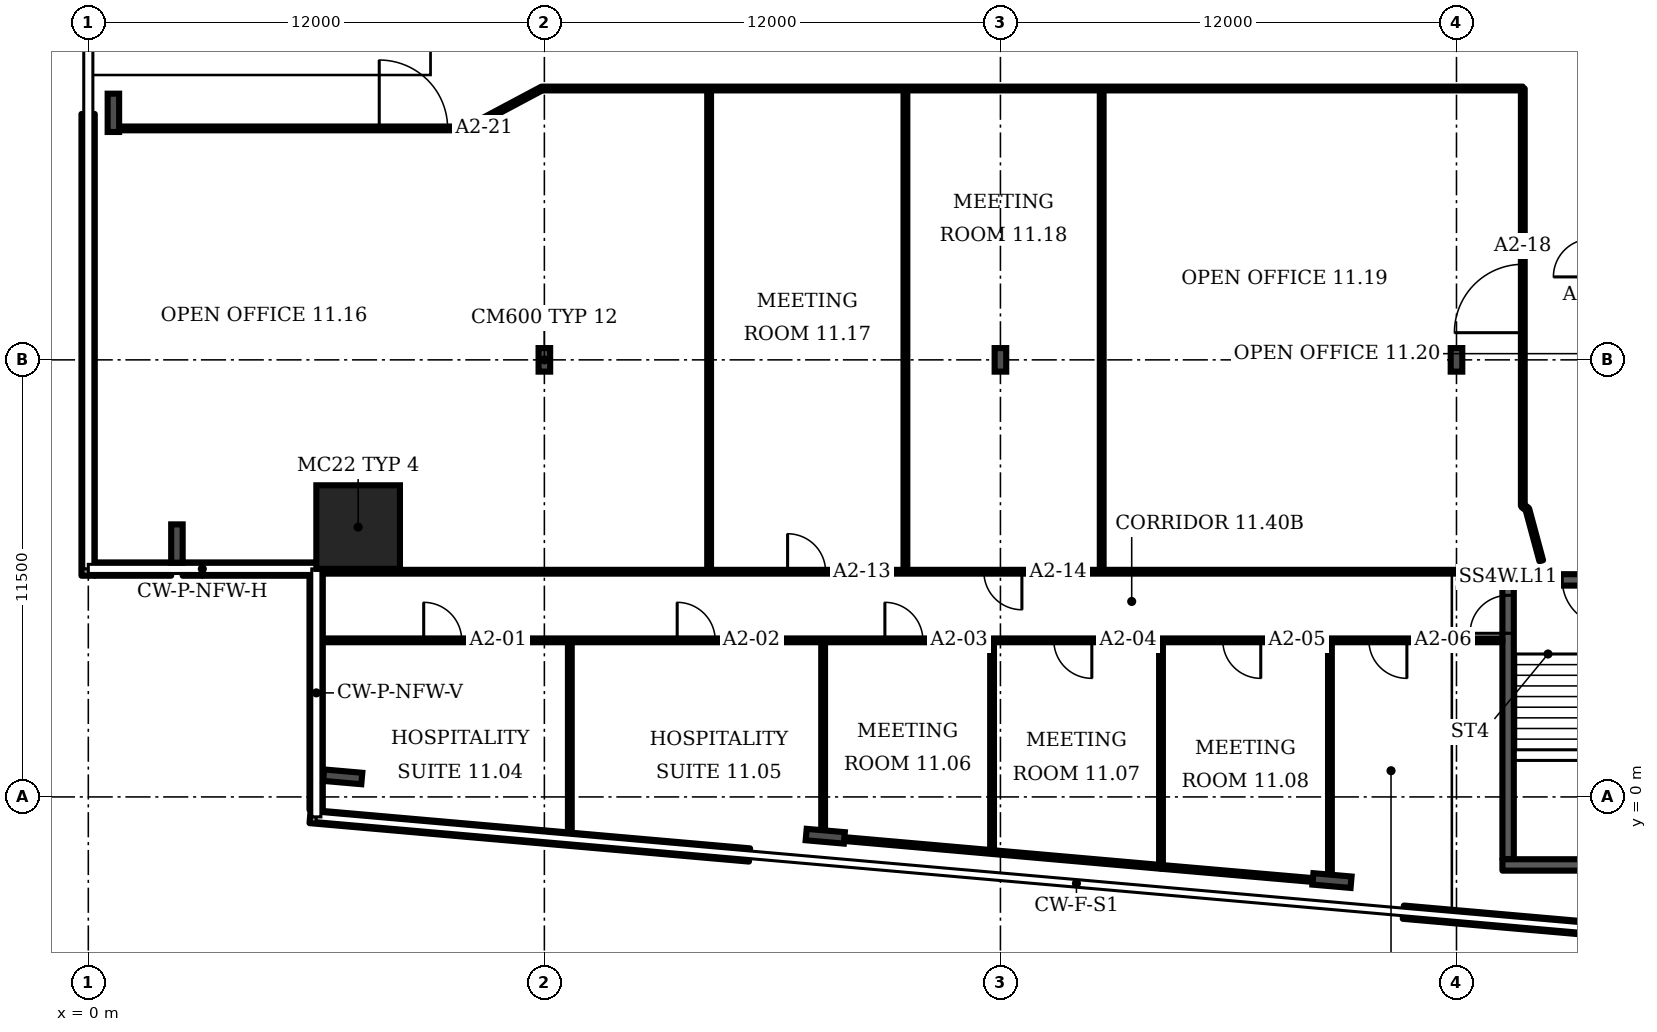
"""IFC4 building model, lengths in metres.
Left out: names, types, materials, properties, quantities, classifications, styles, units other than length and angle.
Written with IfcOpenShell. Run it as: python <this file> out.ifc"""

import sys

from ifc_helpers import new_model, si_unit, direction, frame, frame_2d, origin, origin_2d, place, context, subcontext, project, spatial, rectangle, i_section, extrude, element, fill, save


model = new_model("IFC4")
c1 = context("Model", 3, precision=1e-05, world=origin(), true_north=direction((0.0, 1.0)))
c2 = subcontext(c1, "Body", "Model", "MODEL_VIEW")
j1 = project(units=[si_unit("LENGTHUNIT", "METRE"), si_unit("PLANEANGLEUNIT", "RADIAN")], contexts=[c1])
p1 = place(None, origin())
s1 = spatial("IfcSite", under=j1, at=p1, CompositionType="ELEMENT")
p2 = place(p1, origin())
s2 = spatial("IfcBuilding", under=s1, at=p2, CompositionType="ELEMENT")
p3 = place(p2, frame((0.0, 0.0, 59.5)))
s3 = spatial("IfcBuildingStorey", under=s2, at=p3, CompositionType="ELEMENT", Elevation=59.5)
p4 = place(p3, frame((7.1, 7.1, 0.0), z_axis=(0.0, 0.0, 1.0), x_axis=(1.0, 0.0, 0.0)))
e1 = element("IfcColumn", 1, at=p4, inside=s3, PredefinedType="COLUMN", context=c2, shape_type="SweptSolid", body=[
    extrude(rectangle(XDim=2.2, YDim=2.2, at=origin_2d()), origin(), (0.0, 0.0, 1.0), 3.6),
])
for number, where, z_axis, x_axis in (
    (2, (6.694, 0.529, 0.0), (0.0, 0.0, 1.0), (-0.087, -0.996, 0.0)),
    (3, (19.391, -1.034, 0.0), (0.0, 0.0, 1.0), (-0.087, -0.996, 0.0)),
    (4, (32.724, -2.2, 0.0), (0.0, 0.0, 1.0), (-0.087, -0.996, 0.0)),
    (5, (0.66, 18.0, 0.0), (0.0, 0.0, 1.0), (-1.0, 0.0, 0.0)),
    (6, (2.332, 6.667, 0.0), (0.0, 0.0, 1.0), (-1.0, 0.0, 0.0)),
):
    element("IfcColumn", number, at=place(p3, frame(where, z_axis=z_axis, x_axis=x_axis)), inside=s3, PredefinedType="COLUMN", context=c2, shape_type="SweptSolid", body=[
        extrude(i_section(OverallWidth=0.302, OverallDepth=1.008, WebThickness=0.021, FlangeThickness=0.04, FilletRadius=0.03, at=origin_2d()), origin(), (0.0, 0.0, 1.0), 3.6),
    ])
for number, where, z_axis, x_axis in (
    (7, (12.0, 11.5, 0.0), (0.0, 0.0, 1.0), (1.0, 0.0, 0.0)),
    (8, (24.0, 11.5, 0.0), (0.0, 0.0, 1.0), (1.0, 0.0, 0.0)),
    (9, (36.0, 11.5, 0.0), (0.0, 0.0, 1.0), (1.0, 0.0, 0.0)),
):
    element("IfcColumn", number, at=place(p3, frame(where, z_axis=z_axis, x_axis=x_axis)), inside=s3, PredefinedType="COLUMN", context=c2, shape_type="SweptSolid", body=[
        extrude(i_section(OverallWidth=0.305, OverallDepth=0.62, WebThickness=0.021, FlangeThickness=0.04, FilletRadius=0.027, at=origin_2d()), origin(), (0.0, 0.0, 1.0), 3.6),
    ])
p5 = place(p3, frame((5.835, -0.516, 0.0), z_axis=(0.0, 0.0, 1.0), x_axis=(0.996192, -0.087142, 0.0)))
e10 = element("IfcWall", 10, at=p5, inside=s3, PredefinedType="SOLIDWALL", context=c2, shape_type="SweptSolid", body=[
    extrude(rectangle(XDim=11.607, YDim=0.35, at=frame_2d((5.804, 0.0))), origin(), (0.0, 0.0, 1.0), 1.0),
])
p6 = place(p3, frame((34.601, -3.032, 0.0), z_axis=(0.0, 0.0, 1.0), x_axis=(0.996193, -0.087148, 0.0)))
e11 = element("IfcWall", 11, at=p6, inside=s3, PredefinedType="SOLIDWALL", context=c2, shape_type="SweptSolid", body=[
    extrude(rectangle(XDim=11.458, YDim=0.35, at=frame_2d((5.729, 0.0))), origin(), (0.0, 0.0, 1.0), 1.0),
])
p7 = place(p3, frame((-0.005, 17.97, 0.0), z_axis=(0.0, 0.0, 1.0), x_axis=(0.0, -1.0, 0.0)))
e12 = element("IfcWall", 12, at=p7, inside=s3, PredefinedType="SOLIDWALL", context=c2, shape_type="SweptSolid", body=[
    extrude(rectangle(XDim=12.15, YDim=0.35, at=frame_2d((6.075, 0.0))), origin(), (0.0, 0.0, 1.0), 1.0),
])
p8 = place(p3, frame((0.17, 5.995, 0.0), z_axis=(0.0, 0.0, 1.0), x_axis=(1.0, 0.0, 0.0)))
e13 = element("IfcWall", 13, at=p8, inside=s3, PredefinedType="SOLIDWALL", context=c2, shape_type="SweptSolid", body=[
    extrude(rectangle(XDim=2.011, YDim=0.35, at=frame_2d((1.005, 0.0))), origin(), (0.0, 0.0, 1.0), 1.0),
])
p9 = place(p3, frame((2.483, 5.995, 0.0), z_axis=(0.0, 0.0, 1.0), x_axis=(1.0, 0.0, 0.0)))
e14 = element("IfcWall", 14, at=p9, inside=s3, PredefinedType="SOLIDWALL", context=c2, shape_type="SweptSolid", body=[
    extrude(rectangle(XDim=3.517, YDim=0.35, at=frame_2d((1.759, 0.0))), origin(), (0.0, 0.0, 1.0), 1.0),
])
p10 = place(p3, frame((5.995, 5.82, 0.0), z_axis=(0.0, 0.0, 1.0), x_axis=(0.0, -1.0, 0.0)))
e15 = element("IfcWall", 15, at=p10, inside=s3, PredefinedType="SOLIDWALL", context=c2, shape_type="SweptSolid", body=[
    extrude(rectangle(XDim=6.161, YDim=0.35, at=frame_2d((3.081, 0.0))), origin(), (0.0, 0.0, 1.0), 1.0),
])
p11 = place(p3, frame((37.208, 5.711, 0.0), z_axis=(0.0, 0.0, 1.0), x_axis=(1.0, 0.0, 0.0)))
e16 = element("IfcWall", 16, at=p11, inside=s3, PredefinedType="SHEAR", context=c2, shape_type="SweptSolid", body=[
    extrude(rectangle(XDim=4.35, YDim=0.3, at=frame_2d((2.175, 0.0))), origin(), (0.0, 0.0, 1.0), 3.2),
])
p12 = place(p11, frame((1.575, 0.0, 0.0)))
e17 = element("IfcOpeningElement", 17, at=p12, cuts=e16, PredefinedType="OPENING", context=c2, shape_type="SweptSolid", body=[
    extrude(rectangle(XDim=1.2, YDim=2.1, at=frame_2d((0.6, 1.05))), frame((0.0, 0.16, 0.0), z_axis=(0.0, -1.0, 0.0), x_axis=(1.0, 0.0, 0.0)), (0.0, 0.0, 1.0), 0.32),
])
p13 = place(p3, frame((37.358, -1.639, 0.0), z_axis=(0.0, 0.0, 1.0), x_axis=(0.0, 1.0, 0.0)))
e18 = element("IfcWall", 18, at=p13, inside=s3, PredefinedType="SHEAR", context=c2, shape_type="SweptSolid", body=[
    extrude(rectangle(XDim=7.2, YDim=0.3, at=frame_2d((3.6, 0.0))), origin(), (0.0, 0.0, 1.0), 3.2),
])
p14 = place(p13, frame((5.945, 0.0, 0.0)))
e19 = element("IfcOpeningElement", 19, at=p14, cuts=e18, PredefinedType="OPENING", context=c2, shape_type="SweptSolid", body=[
    extrude(rectangle(XDim=1.0, YDim=2.1, at=frame_2d((0.5, 1.05))), frame((0.0, 0.16, 0.0), z_axis=(0.0, -1.0, 0.0), x_axis=(1.0, 0.0, 0.0)), (0.0, 0.0, 1.0), 0.32),
])
p15 = place(p3, frame((0.63, 17.59, 0.0), z_axis=(0.0, 0.0, 1.0), x_axis=(1.0, 0.0, 0.0)))
e20 = element("IfcWall", 20, at=p15, inside=s3, PredefinedType="PARTITIONING", context=c2, shape_type="SweptSolid", body=[
    extrude(rectangle(XDim=9.55, YDim=0.1, at=frame_2d((4.775, 0.0))), origin(), (0.0, 0.0, 1.0), 3.2),
])
p16 = place(p15, frame((7.025, 0.0, 0.0)))
e21 = element("IfcOpeningElement", 21, at=p16, cuts=e20, PredefinedType="OPENING", context=c2, shape_type="SweptSolid", body=[
    extrude(rectangle(XDim=1.8, YDim=2.1, at=frame_2d((0.9, 1.05))), frame((0.0, 0.06, 0.0), z_axis=(0.0, -1.0, 0.0), x_axis=(1.0, 0.0, 0.0)), (0.0, 0.0, 1.0), 0.12),
])
p17 = place(p3, frame((6.02, 4.12, 0.0), z_axis=(0.0, 0.0, 1.0), x_axis=(1.0, 0.0, 0.0)))
e22 = element("IfcWall", 22, at=p17, inside=s3, PredefinedType="PARTITIONING", context=c2, shape_type="SweptSolid", body=[
    extrude(rectangle(XDim=31.188, YDim=0.1, at=frame_2d((15.594, 0.0))), origin(), (0.0, 0.0, 1.0), 3.2),
])
p18 = place(p17, frame((2.805, 0.0, 0.0)))
e23 = element("IfcOpeningElement", 23, at=p18, cuts=e22, PredefinedType="OPENING", context=c2, shape_type="SweptSolid", body=[
    extrude(rectangle(XDim=1.0, YDim=2.1, at=frame_2d((0.5, 1.05))), frame((0.0, 0.06, 0.0), z_axis=(0.0, -1.0, 0.0), x_axis=(1.0, 0.0, 0.0)), (0.0, 0.0, 1.0), 0.12),
])
p19 = place(p17, frame((9.475, 0.0, 0.0)))
e24 = element("IfcOpeningElement", 24, at=p19, cuts=e22, PredefinedType="OPENING", context=c2, shape_type="SweptSolid", body=[
    extrude(rectangle(XDim=1.0, YDim=2.1, at=frame_2d((0.5, 1.05))), frame((0.0, 0.06, 0.0), z_axis=(0.0, -1.0, 0.0), x_axis=(1.0, 0.0, 0.0)), (0.0, 0.0, 1.0), 0.12),
])
p20 = place(p17, frame((14.94, 0.0, 0.0)))
e25 = element("IfcOpeningElement", 25, at=p20, cuts=e22, PredefinedType="OPENING", context=c2, shape_type="SweptSolid", body=[
    extrude(rectangle(XDim=1.0, YDim=2.1, at=frame_2d((0.5, 1.05))), frame((0.0, 0.06, 0.0), z_axis=(0.0, -1.0, 0.0), x_axis=(1.0, 0.0, 0.0)), (0.0, 0.0, 1.0), 0.12),
])
p21 = place(p17, frame((19.385, 0.0, 0.0)))
e26 = element("IfcOpeningElement", 26, at=p21, cuts=e22, PredefinedType="OPENING", context=c2, shape_type="SweptSolid", body=[
    extrude(rectangle(XDim=1.0, YDim=2.1, at=frame_2d((0.5, 1.05))), frame((0.0, 0.06, 0.0), z_axis=(0.0, -1.0, 0.0), x_axis=(1.0, 0.0, 0.0)), (0.0, 0.0, 1.0), 0.12),
])
p22 = place(p17, frame((23.83, 0.0, 0.0)))
e27 = element("IfcOpeningElement", 27, at=p22, cuts=e22, PredefinedType="OPENING", context=c2, shape_type="SweptSolid", body=[
    extrude(rectangle(XDim=1.0, YDim=2.1, at=frame_2d((0.5, 1.05))), frame((0.0, 0.06, 0.0), z_axis=(0.0, -1.0, 0.0), x_axis=(1.0, 0.0, 0.0)), (0.0, 0.0, 1.0), 0.12),
])
p23 = place(p17, frame((27.675, 0.0, 0.0)))
e28 = element("IfcOpeningElement", 28, at=p23, cuts=e22, PredefinedType="OPENING", context=c2, shape_type="SweptSolid", body=[
    extrude(rectangle(XDim=1.0, YDim=2.1, at=frame_2d((0.5, 1.05))), frame((0.0, 0.06, 0.0), z_axis=(0.0, -1.0, 0.0), x_axis=(1.0, 0.0, 0.0)), (0.0, 0.0, 1.0), 0.12),
])
p24 = place(p3, frame((6.02, 5.925, 0.0), z_axis=(0.0, 0.0, 1.0), x_axis=(1.0, 0.0, 0.0)))
e29 = element("IfcWall", 29, at=p24, inside=s3, PredefinedType="PARTITIONING", context=c2, shape_type="SweptSolid", body=[
    extrude(rectangle(XDim=32.21, YDim=0.1, at=frame_2d((16.105, 0.0))), origin(), (0.0, 0.0, 1.0), 3.2),
])
p25 = place(p24, frame((12.38, 0.0, 0.0)))
e30 = element("IfcOpeningElement", 30, at=p25, cuts=e29, PredefinedType="OPENING", context=c2, shape_type="SweptSolid", body=[
    extrude(rectangle(XDim=1.0, YDim=2.1, at=frame_2d((0.5, 1.05))), frame((0.0, 0.06, 0.0), z_axis=(0.0, -1.0, 0.0), x_axis=(1.0, 0.0, 0.0)), (0.0, 0.0, 1.0), 0.12),
])
p26 = place(p24, frame((17.545, 0.0, 0.0)))
e31 = element("IfcOpeningElement", 31, at=p26, cuts=e29, PredefinedType="OPENING", context=c2, shape_type="SweptSolid", body=[
    extrude(rectangle(XDim=1.0, YDim=2.1, at=frame_2d((0.5, 1.05))), frame((0.0, 0.06, 0.0), z_axis=(0.0, -1.0, 0.0), x_axis=(1.0, 0.0, 0.0)), (0.0, 0.0, 1.0), 0.12),
])
p27 = place(p3, frame((10.18, 17.59, 0.0), z_axis=(0.0, 0.0, 1.0), x_axis=(0.435266, 0.900306, 0.0)))
e32 = element("IfcWall", 32, at=p27, inside=s3, PredefinedType="PARTITIONING", context=c2, shape_type="SweptSolid", body=[
    extrude(rectangle(XDim=0.172, YDim=0.1, at=frame_2d((0.086, 0.0))), origin(), (0.0, 0.0, 1.0), 3.2),
])
p28 = place(p3, frame((10.255, 17.745, 0.0), z_axis=(0.0, 0.0, 1.0), x_axis=(0.882644, 0.470051, 0.0)))
e33 = element("IfcWall", 33, at=p28, inside=s3, PredefinedType="PARTITIONING", context=c2, shape_type="SweptSolid", body=[
    extrude(rectangle(XDim=1.904, YDim=0.1, at=frame_2d((0.952, 0.0))), origin(), (0.0, 0.0, 1.0), 3.2),
])
p29 = place(p3, frame((11.935, 18.64, 0.0), z_axis=(0.0, 0.0, 1.0), x_axis=(1.0, 0.0, 0.0)))
e34 = element("IfcWall", 34, at=p29, inside=s3, PredefinedType="PARTITIONING", context=c2, shape_type="SweptSolid", body=[
    extrude(rectangle(XDim=25.81, YDim=0.1, at=frame_2d((12.905, 0.0))), origin(), (0.0, 0.0, 1.0), 3.2),
])
p30 = place(p3, frame((12.67, -1.088, 0.0), z_axis=(0.0, 0.0, 1.0), x_axis=(0.0, 1.0, 0.0)))
e35 = element("IfcWall", 35, at=p30, inside=s3, PredefinedType="PARTITIONING", context=c2, shape_type="SweptSolid", body=[
    extrude(rectangle(XDim=5.208, YDim=0.1, at=frame_2d((2.604, 0.0))), origin(), (0.0, 0.0, 1.0), 3.2),
])
p31 = place(p3, frame((16.335, 5.925, 0.0), z_axis=(0.0, 0.0, 1.0), x_axis=(0.0, 1.0, 0.0)))
e36 = element("IfcWall", 36, at=p31, inside=s3, PredefinedType="PARTITIONING", context=c2, shape_type="SweptSolid", body=[
    extrude(rectangle(XDim=12.715, YDim=0.1, at=frame_2d((6.357, 0.0))), origin(), (0.0, 0.0, 1.0), 3.2),
])
p32 = place(p3, frame((19.335, -1.06, 0.0), z_axis=(0.0, 0.0, 1.0), x_axis=(0.0, 1.0, 0.0)))
e37 = element("IfcWall", 37, at=p32, inside=s3, PredefinedType="PARTITIONING", context=c2, shape_type="SweptSolid", body=[
    extrude(rectangle(XDim=5.18, YDim=0.1, at=frame_2d((2.59, 0.0))), origin(), (0.0, 0.0, 1.0), 3.2),
])
p33 = place(p3, frame((21.5, 5.925, 0.0), z_axis=(0.0, 0.0, 1.0), x_axis=(0.0, 1.0, 0.0)))
e38 = element("IfcWall", 38, at=p33, inside=s3, PredefinedType="PARTITIONING", context=c2, shape_type="SweptSolid", body=[
    extrude(rectangle(XDim=12.715, YDim=0.1, at=frame_2d((6.357, 0.0))), origin(), (0.0, 0.0, 1.0), 3.2),
])
p34 = place(p3, frame((23.78, -1.45, 0.0), z_axis=(0.0, 0.0, 1.0), x_axis=(0.0, 1.0, 0.0)))
e39 = element("IfcWall", 39, at=p34, inside=s3, PredefinedType="PARTITIONING", context=c2, shape_type="SweptSolid", body=[
    extrude(rectangle(XDim=5.57, YDim=0.1, at=frame_2d((2.785, 0.0))), origin(), (0.0, 0.0, 1.0), 3.2),
])
p35 = place(p3, frame((26.665, 5.925, 0.0), z_axis=(0.0, 0.0, 1.0), x_axis=(0.0, 1.0, 0.0)))
e40 = element("IfcWall", 40, at=p35, inside=s3, PredefinedType="PARTITIONING", context=c2, shape_type="SweptSolid", body=[
    extrude(rectangle(XDim=12.715, YDim=0.1, at=frame_2d((6.357, 0.0))), origin(), (0.0, 0.0, 1.0), 3.2),
])
p36 = place(p3, frame((28.22, -1.84, 0.0), z_axis=(0.0, 0.0, 1.0), x_axis=(-0.996164, 0.087512, 0.0)))
e41 = element("IfcWall", 41, at=p36, inside=s3, PredefinedType="PARTITIONING", context=c2, shape_type="SweptSolid", body=[
    extrude(rectangle(XDim=8.919, YDim=0.1, at=frame_2d((4.459, 0.0))), origin(), (0.0, 0.0, 1.0), 2.58),
])
p37 = place(p3, frame((28.225, -1.84, 0.0), z_axis=(0.0, 0.0, 1.0), x_axis=(0.0, 1.0, 0.0)))
e42 = element("IfcWall", 42, at=p37, inside=s3, PredefinedType="PARTITIONING", context=c2, shape_type="SweptSolid", body=[
    extrude(rectangle(XDim=5.96, YDim=0.1, at=frame_2d((2.98, 0.0))), origin(), (0.0, 0.0, 1.0), 3.2),
])
p38 = place(p3, frame((32.665, -2.225, 0.0), z_axis=(0.0, 0.0, 1.0), x_axis=(-0.996263, 0.086391, 0.0)))
e43 = element("IfcWall", 43, at=p38, inside=s3, PredefinedType="PARTITIONING", context=c2, shape_type="SweptSolid", body=[
    extrude(rectangle(XDim=4.457, YDim=0.1, at=frame_2d((2.228, 0.0))), origin(), (0.0, 0.0, 1.0), 2.58),
])
p39 = place(p3, frame((32.67, -2.225, 0.0), z_axis=(0.0, 0.0, 1.0), x_axis=(0.0, 1.0, 0.0)))
e44 = element("IfcWall", 44, at=p39, inside=s3, PredefinedType="PARTITIONING", context=c2, shape_type="SweptSolid", body=[
    extrude(rectangle(XDim=6.345, YDim=0.1, at=frame_2d((3.173, 0.0))), origin(), (0.0, 0.0, 1.0), 3.2),
])
p40 = place(p3, frame((37.745, 7.66, 0.0), z_axis=(0.0, 0.0, 1.0), x_axis=(0.0, 1.0, 0.0)))
e45 = element("IfcWall", 45, at=p40, inside=s3, PredefinedType="PARTITIONING", context=c2, shape_type="SweptSolid", body=[
    extrude(rectangle(XDim=10.98, YDim=0.1, at=frame_2d((5.49, 0.0))), origin(), (0.0, 0.0, 1.0), 3.2),
])
p41 = place(p40, frame((4.555, 0.0, 0.0)))
e46 = element("IfcOpeningElement", 46, at=p41, cuts=e45, PredefinedType="OPENING", context=c2, shape_type="SweptSolid", body=[
    extrude(rectangle(XDim=1.8, YDim=2.1, at=frame_2d((0.9, 1.05))), frame((0.0, 0.06, 0.0), z_axis=(0.0, -1.0, 0.0), x_axis=(1.0, 0.0, 0.0)), (0.0, 0.0, 1.0), 0.12),
])
p42 = place(p3, frame((37.865, 7.57, 0.0), z_axis=(0.0, 0.0, 1.0), x_axis=(-0.800198, 0.599741, 0.0)))
e47 = element("IfcWall", 47, at=p42, inside=s3, PredefinedType="PARTITIONING", context=c2, shape_type="SweptSolid", body=[
    extrude(rectangle(XDim=0.15, YDim=0.1, at=frame_2d((0.075, 0.0))), origin(), (0.0, 0.0, 1.0), 3.2),
])
p43 = place(p3, frame((38.23, 6.215, 0.0), z_axis=(0.0, 0.0, 1.0), x_axis=(-0.260099, 0.965585, 0.0)))
e48 = element("IfcWall", 48, at=p43, inside=s3, PredefinedType="PARTITIONING", context=c2, shape_type="SweptSolid", body=[
    extrude(rectangle(XDim=1.403, YDim=0.1, at=frame_2d((0.702, 0.0))), origin(), (0.0, 0.0, 1.0), 3.2),
])
p44 = place(p3, frame((37.208, -1.789, 0.0), z_axis=(0.0, 0.0, 1.0), x_axis=(1.0, 0.0, 0.0)))
e49 = element("IfcWall", 49, at=p44, inside=s3, PredefinedType="SHEAR", context=c2, shape_type="SweptSolid", body=[
    extrude(rectangle(XDim=4.35, YDim=0.3, at=frame_2d((2.175, 0.0))), origin(), (0.0, 0.0, 1.0), 3.2),
])
p45 = place(p14, origin())
e50 = element("IfcDoor", 50, at=p45, inside=s3, OperationType="SINGLE_SWING_LEFT", PredefinedType="DOOR", context=c2, shape_type="SweptSolid", body=[
    extrude(rectangle(XDim=1.0, YDim=2.1, at=frame_2d((0.5, 1.05))), frame((0.0, 0.025, 0.0), z_axis=(0.0, -1.0, 0.0), x_axis=(1.0, 0.0, 0.0)), (0.0, 0.0, 1.0), 0.05),
])
fill(e19, e50)
p46 = place(p12, origin())
e51 = element("IfcDoor", 51, at=p46, inside=s3, OperationType="SINGLE_SWING_RIGHT", PredefinedType="DOOR", context=c2, shape_type="SweptSolid", body=[
    extrude(rectangle(XDim=1.2, YDim=2.1, at=frame_2d((0.6, 1.05))), frame((0.0, 0.025, 0.0), z_axis=(0.0, -1.0, 0.0), x_axis=(1.0, 0.0, 0.0)), (0.0, 0.0, 1.0), 0.05),
])
fill(e17, e51)
p47 = place(p18, origin())
e52 = element("IfcDoor", 52, at=p47, inside=s3, OperationType="SINGLE_SWING_LEFT", PredefinedType="DOOR", context=c2, shape_type="SweptSolid", body=[
    extrude(rectangle(XDim=1.0, YDim=2.1, at=frame_2d((0.5, 1.05))), frame((0.0, 0.025, 0.0), z_axis=(0.0, -1.0, 0.0), x_axis=(1.0, 0.0, 0.0)), (0.0, 0.0, 1.0), 0.05),
])
fill(e23, e52)
p48 = place(p19, origin())
e53 = element("IfcDoor", 53, at=p48, inside=s3, OperationType="SINGLE_SWING_LEFT", PredefinedType="DOOR", context=c2, shape_type="SweptSolid", body=[
    extrude(rectangle(XDim=1.0, YDim=2.1, at=frame_2d((0.5, 1.05))), frame((0.0, 0.025, 0.0), z_axis=(0.0, -1.0, 0.0), x_axis=(1.0, 0.0, 0.0)), (0.0, 0.0, 1.0), 0.05),
])
fill(e24, e53)
p49 = place(p20, origin())
e54 = element("IfcDoor", 54, at=p49, inside=s3, OperationType="SINGLE_SWING_LEFT", PredefinedType="DOOR", context=c2, shape_type="SweptSolid", body=[
    extrude(rectangle(XDim=1.0, YDim=2.1, at=frame_2d((0.5, 1.05))), frame((0.0, 0.025, 0.0), z_axis=(0.0, -1.0, 0.0), x_axis=(1.0, 0.0, 0.0)), (0.0, 0.0, 1.0), 0.05),
])
fill(e25, e54)
p50 = place(p21, origin())
e55 = element("IfcDoor", 55, at=p50, inside=s3, OperationType="SINGLE_SWING_RIGHT", PredefinedType="DOOR", context=c2, shape_type="SweptSolid", body=[
    extrude(rectangle(XDim=1.0, YDim=2.1, at=frame_2d((0.5, 1.05))), frame((0.0, 0.025, 0.0), z_axis=(0.0, -1.0, 0.0), x_axis=(1.0, 0.0, 0.0)), (0.0, 0.0, 1.0), 0.05),
])
fill(e26, e55)
p51 = place(p22, origin())
e56 = element("IfcDoor", 56, at=p51, inside=s3, OperationType="SINGLE_SWING_RIGHT", PredefinedType="DOOR", context=c2, shape_type="SweptSolid", body=[
    extrude(rectangle(XDim=1.0, YDim=2.1, at=frame_2d((0.5, 1.05))), frame((0.0, 0.025, 0.0), z_axis=(0.0, -1.0, 0.0), x_axis=(1.0, 0.0, 0.0)), (0.0, 0.0, 1.0), 0.05),
])
fill(e27, e56)
p52 = place(p23, origin())
e57 = element("IfcDoor", 57, at=p52, inside=s3, OperationType="SINGLE_SWING_RIGHT", PredefinedType="DOOR", context=c2, shape_type="SweptSolid", body=[
    extrude(rectangle(XDim=1.0, YDim=2.1, at=frame_2d((0.5, 1.05))), frame((0.0, 0.025, 0.0), z_axis=(0.0, -1.0, 0.0), x_axis=(1.0, 0.0, 0.0)), (0.0, 0.0, 1.0), 0.05),
])
fill(e28, e57)
p53 = place(p25, origin())
e58 = element("IfcDoor", 58, at=p53, inside=s3, OperationType="SINGLE_SWING_LEFT", PredefinedType="DOOR", context=c2, shape_type="SweptSolid", body=[
    extrude(rectangle(XDim=1.0, YDim=2.1, at=frame_2d((0.5, 1.05))), frame((0.0, 0.025, 0.0), z_axis=(0.0, -1.0, 0.0), x_axis=(1.0, 0.0, 0.0)), (0.0, 0.0, 1.0), 0.05),
])
fill(e30, e58)
p54 = place(p26, origin())
e59 = element("IfcDoor", 59, at=p54, inside=s3, OperationType="SINGLE_SWING_RIGHT", PredefinedType="DOOR", context=c2, shape_type="SweptSolid", body=[
    extrude(rectangle(XDim=1.0, YDim=2.1, at=frame_2d((0.5, 1.05))), frame((0.0, 0.025, 0.0), z_axis=(0.0, -1.0, 0.0), x_axis=(1.0, 0.0, 0.0)), (0.0, 0.0, 1.0), 0.05),
])
fill(e31, e59)
p55 = place(p41, origin())
e60 = element("IfcDoor", 60, at=p55, inside=s3, OperationType="DOUBLE_DOOR_SINGLE_SWING", PredefinedType="DOOR", context=c2, shape_type="SweptSolid", body=[
    extrude(rectangle(XDim=1.8, YDim=2.1, at=frame_2d((0.9, 1.05))), frame((0.0, 0.025, 0.0), z_axis=(0.0, -1.0, 0.0), x_axis=(1.0, 0.0, 0.0)), (0.0, 0.0, 1.0), 0.05),
])
fill(e46, e60)
p56 = place(p16, origin())
e61 = element("IfcDoor", 61, at=p56, inside=s3, OperationType="DOUBLE_DOOR_SINGLE_SWING", PredefinedType="DOOR", context=c2, shape_type="SweptSolid", body=[
    extrude(rectangle(XDim=1.8, YDim=2.1, at=frame_2d((0.9, 1.05))), frame((0.0, 0.025, 0.0), z_axis=(0.0, -1.0, 0.0), x_axis=(1.0, 0.0, 0.0)), (0.0, 0.0, 1.0), 0.05),
])
fill(e21, e61)
save(model, sys.argv[1])
